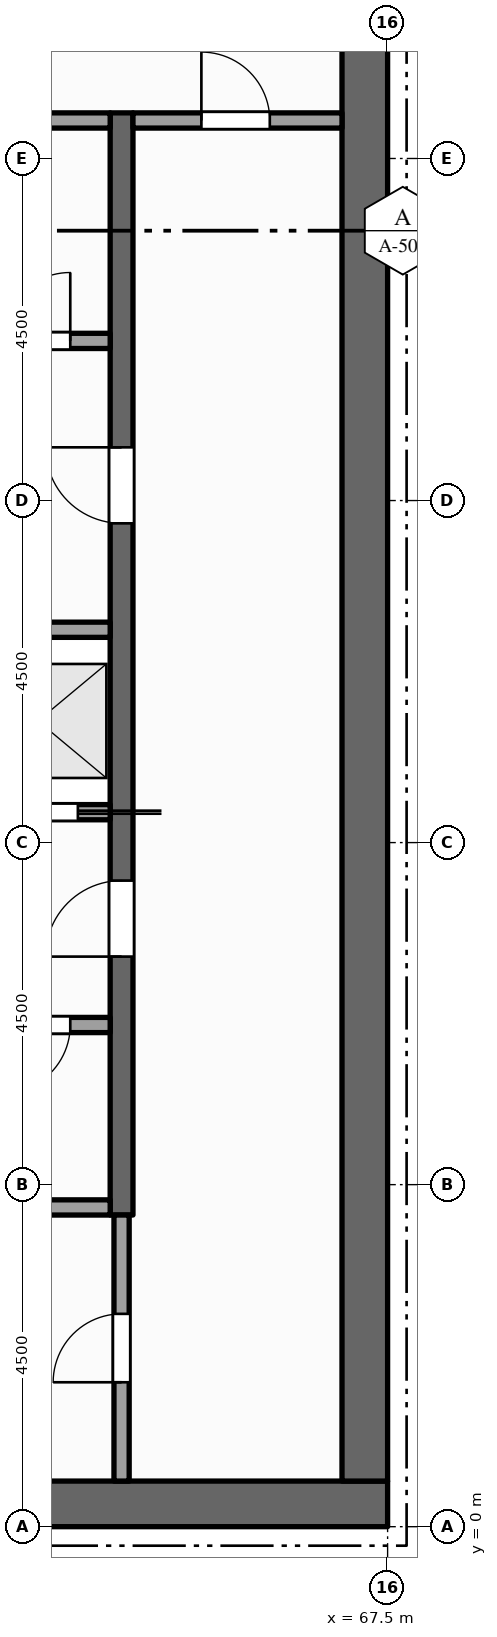
"""IFC4 building model, lengths in metres.
Left out: names, types, materials, properties, quantities, classifications, styles, units other than length and angle.
Written with IfcOpenShell. Run it as: python <this file> out.ifc"""

import sys

from ifc_helpers import new_model, si_unit, direction, frame, frame_2d, origin, place, context, subcontext, project, spatial, rectangle, extrude, element, fill, save


model = new_model("IFC4")
c1 = context("Model", 3, precision=1e-05, world=origin(), true_north=direction((0.0, 1.0)))
c2 = subcontext(c1, "Body", "Model", "MODEL_VIEW")
j1 = project(units=[si_unit("LENGTHUNIT", "METRE"), si_unit("PLANEANGLEUNIT", "RADIAN")], contexts=[c1])
p1 = place(None, origin())
s1 = spatial("IfcSite", under=j1, at=p1, CompositionType="ELEMENT")
p2 = place(p1, origin())
s2 = spatial("IfcBuilding", under=s1, at=p2, CompositionType="ELEMENT")
p3 = place(p2, frame((0.0, 0.0, 318.5)))
s3 = spatial("IfcBuildingStorey", under=s2, at=p3, CompositionType="ELEMENT", Elevation=318.5)
p4 = place(p3, frame((67.5, 0.3, -0.15), z_axis=(0.0, 0.0, 1.0), x_axis=(-1.0, 0.0, 0.0)))
e1 = element("IfcWall", 1, at=p4, inside=s3, PredefinedType="SHEAR", context=c2, shape_type="SweptSolid", body=[
    extrude(rectangle(XDim=13.5, YDim=0.6, at=frame_2d((6.75, 0.0))), origin(), (0.0, 0.0, 1.0), 4.5),
])
p5 = place(p3, frame((67.2, 0.6, -0.15), z_axis=(0.0, 0.0, 1.0), x_axis=(0.0, 1.0, 0.0)))
e2 = element("IfcWall", 2, at=p5, inside=s3, PredefinedType="SHEAR", context=c2, shape_type="SweptSolid", body=[
    extrude(rectangle(XDim=21.3, YDim=0.6, at=frame_2d((10.65, 0.0))), origin(), (0.0, 0.0, 1.0), 4.5),
])
p6 = place(p3, frame((64.0, 0.6, 0.0), z_axis=(0.0, 0.0, 1.0), x_axis=(0.0, 1.0, 0.0)))
e3 = element("IfcWall", 3, at=p6, inside=s3, PredefinedType="PARTITIONING", context=c2, shape_type="SweptSolid", body=[
    extrude(rectangle(XDim=3.5, YDim=0.2, at=frame_2d((1.75, 0.0))), origin(), (0.0, 0.0, 1.0), 4.35),
])
p7 = place(p6, frame((1.3, 0.0, 0.0)))
e4 = element("IfcOpeningElement", 4, at=p7, cuts=e3, PredefinedType="OPENING", context=c2, shape_type="SweptSolid", body=[
    extrude(rectangle(XDim=0.9, YDim=2.1, at=frame_2d((0.45, 1.05))), frame((0.0, 0.11, 0.0), z_axis=(0.0, -1.0, 0.0), x_axis=(1.0, 0.0, 0.0)), (0.0, 0.0, 1.0), 0.22),
])
p8 = place(p3, frame((64.0, 4.1, 0.0), z_axis=(0.0, 0.0, 1.0), x_axis=(0.0, 1.0, 0.0)))
e5 = element("IfcWall", 5, at=p8, inside=s3, PredefinedType="SHEAR", context=c2, shape_type="SweptSolid", body=[
    extrude(rectangle(XDim=14.5, YDim=0.3, at=frame_2d((7.25, 0.0))), origin(), (0.0, 0.0, 1.0), 4.35),
])
p9 = place(p8, frame((3.4, 0.0, 0.0)))
e6 = element("IfcOpeningElement", 6, at=p9, cuts=e5, PredefinedType="OPENING", context=c2, shape_type="SweptSolid", body=[
    extrude(rectangle(XDim=1.0, YDim=2.1, at=frame_2d((0.5, 1.05))), frame((0.0, 0.16, 0.0), z_axis=(0.0, -1.0, 0.0), x_axis=(1.0, 0.0, 0.0)), (0.0, 0.0, 1.0), 0.32),
])
p10 = place(p8, frame((9.1, 0.0, 0.0)))
e7 = element("IfcOpeningElement", 7, at=p10, cuts=e5, PredefinedType="OPENING", context=c2, shape_type="SweptSolid", body=[
    extrude(rectangle(XDim=1.0, YDim=2.1, at=frame_2d((0.5, 1.05))), frame((0.0, 0.16, 0.0), z_axis=(0.0, -1.0, 0.0), x_axis=(1.0, 0.0, 0.0)), (0.0, 0.0, 1.0), 0.32),
])
p11 = place(p3, frame((61.9, 4.2, 0.0), z_axis=(0.0, 0.0, 1.0), x_axis=(1.0, 0.0, 0.0)))
e8 = element("IfcWall", 8, at=p11, inside=s3, PredefinedType="PARTITIONING", context=c2, shape_type="SweptSolid", body=[
    extrude(rectangle(XDim=1.95, YDim=0.2, at=frame_2d((0.975, 0.0))), origin(), (0.0, 0.0, 1.0), 4.35),
])
p12 = place(p3, frame((61.9, 6.6, 0.0), z_axis=(0.0, 0.0, 1.0), x_axis=(1.0, 0.0, 0.0)))
e9 = element("IfcWall", 9, at=p12, inside=s3, PredefinedType="PARTITIONING", context=c2, shape_type="SweptSolid", body=[
    extrude(rectangle(XDim=1.95, YDim=0.2, at=frame_2d((0.975, 0.0))), origin(), (0.0, 0.0, 1.0), 4.35),
])
p13 = place(p12, frame((0.525, 0.0, 0.0)))
e10 = element("IfcOpeningElement", 10, at=p13, cuts=e9, PredefinedType="OPENING", context=c2, shape_type="SweptSolid", body=[
    extrude(rectangle(XDim=0.9, YDim=2.1, at=frame_2d((0.45, 1.05))), frame((0.0, 0.11, 0.0), z_axis=(0.0, -1.0, 0.0), x_axis=(1.0, 0.0, 0.0)), (0.0, 0.0, 1.0), 0.22),
])
p14 = place(p3, frame((61.9, 9.4, 0.0), z_axis=(0.0, 0.0, 1.0), x_axis=(1.0, 0.0, 0.0)))
e11 = element("IfcWall", 11, at=p14, inside=s3, PredefinedType="SOLIDWALL", context=c2, shape_type="SweptSolid", body=[
    extrude(rectangle(XDim=1.95, YDim=0.2, at=frame_2d((0.975, 0.0))), origin(), (0.0, 0.0, 1.0), 4.35),
])
p15 = place(p14, frame((0.425, 0.0, 0.012)))
e12 = element("IfcOpeningElement", 12, at=p15, cuts=e11, PredefinedType="OPENING", context=c2, shape_type="SweptSolid", body=[
    extrude(rectangle(XDim=1.1, YDim=2.1, at=frame_2d((0.55, 1.05))), frame((0.0, 0.11, 0.0), z_axis=(0.0, -1.0, 0.0), x_axis=(1.0, 0.0, 0.0)), (0.0, 0.0, 1.0), 0.22),
])
p16 = place(p3, frame((61.9, 11.8, 0.0), z_axis=(0.0, 0.0, 1.0), x_axis=(1.0, 0.0, 0.0)))
e13 = element("IfcWall", 13, at=p16, inside=s3, PredefinedType="SOLIDWALL", context=c2, shape_type="SweptSolid", body=[
    extrude(rectangle(XDim=1.95, YDim=0.2, at=frame_2d((0.975, 0.0))), origin(), (0.0, 0.0, 1.0), 4.35),
])
p17 = place(p3, frame((61.9, 15.6, 0.0), z_axis=(0.0, 0.0, 1.0), x_axis=(1.0, 0.0, 0.0)))
e14 = element("IfcWall", 14, at=p17, inside=s3, PredefinedType="PARTITIONING", context=c2, shape_type="SweptSolid", body=[
    extrude(rectangle(XDim=1.95, YDim=0.2, at=frame_2d((0.975, 0.0))), origin(), (0.0, 0.0, 1.0), 4.35),
])
p18 = place(p17, frame((0.525, 0.0, 0.0)))
e15 = element("IfcOpeningElement", 15, at=p18, cuts=e14, PredefinedType="OPENING", context=c2, shape_type="SweptSolid", body=[
    extrude(rectangle(XDim=0.9, YDim=2.1, at=frame_2d((0.45, 1.05))), frame((0.0, 0.11, 0.0), z_axis=(0.0, -1.0, 0.0), x_axis=(1.0, 0.0, 0.0)), (0.0, 0.0, 1.0), 0.22),
])
p19 = place(p3, frame((61.9, 18.5, 0.0), z_axis=(0.0, 0.0, 1.0), x_axis=(1.0, 0.0, 0.0)))
e16 = element("IfcWall", 16, at=p19, inside=s3, PredefinedType="PARTITIONING", context=c2, shape_type="SweptSolid", body=[
    extrude(rectangle(XDim=1.95, YDim=0.2, at=frame_2d((0.975, 0.0))), origin(), (0.0, 0.0, 1.0), 4.35),
])
p20 = place(p3, frame((64.15, 18.5, 0.0), z_axis=(0.0, 0.0, 1.0), x_axis=(1.0, 0.0, 0.0)))
e17 = element("IfcWall", 17, at=p20, inside=s3, PredefinedType="PARTITIONING", context=c2, shape_type="SweptSolid", body=[
    extrude(rectangle(XDim=2.75, YDim=0.2, at=frame_2d((1.375, 0.0))), origin(), (0.0, 0.0, 1.0), 4.35),
])
p21 = place(p20, frame((0.9, 0.0, 0.0)))
e18 = element("IfcOpeningElement", 18, at=p21, cuts=e17, PredefinedType="OPENING", context=c2, shape_type="SweptSolid", body=[
    extrude(rectangle(XDim=0.9, YDim=2.1, at=frame_2d((0.45, 1.05))), frame((0.0, 0.11, 0.0), z_axis=(0.0, -1.0, 0.0), x_axis=(1.0, 0.0, 0.0)), (0.0, 0.0, 1.0), 0.22),
])
p22 = place(p15, origin())
e19 = element("IfcDoor", 19, at=p22, inside=s3, OperationType="SLIDING_TO_RIGHT", PredefinedType="DOOR", context=c2, shape_type="SweptSolid", body=[
    extrude(rectangle(XDim=1.1, YDim=2.1, at=frame_2d((0.55, 1.05))), frame((0.0, 0.025, 0.0), z_axis=(0.0, -1.0, 0.0), x_axis=(1.0, 0.0, 0.0)), (0.0, 0.0, 1.0), 0.05),
])
fill(e12, e19)
p23 = place(p9, origin())
e20 = element("IfcDoor", 20, at=p23, inside=s3, OperationType="SINGLE_SWING_LEFT", PredefinedType="DOOR", context=c2, shape_type="SweptSolid", body=[
    extrude(rectangle(XDim=1.0, YDim=2.1, at=frame_2d((0.5, 1.05))), frame((0.0, 0.025, 0.0), z_axis=(0.0, -1.0, 0.0), x_axis=(1.0, 0.0, 0.0)), (0.0, 0.0, 1.0), 0.05),
])
fill(e6, e20)
p24 = place(p10, origin())
e21 = element("IfcDoor", 21, at=p24, inside=s3, OperationType="SINGLE_SWING_RIGHT", PredefinedType="DOOR", context=c2, shape_type="SweptSolid", body=[
    extrude(rectangle(XDim=1.0, YDim=2.1, at=frame_2d((0.5, 1.05))), frame((0.0, 0.025, 0.0), z_axis=(0.0, -1.0, 0.0), x_axis=(1.0, 0.0, 0.0)), (0.0, 0.0, 1.0), 0.05),
])
fill(e7, e21)
p25 = place(p7, origin())
e22 = element("IfcDoor", 22, at=p25, inside=s3, OperationType="SINGLE_SWING_LEFT", PredefinedType="DOOR", context=c2, shape_type="SweptSolid", body=[
    extrude(rectangle(XDim=0.9, YDim=2.1, at=frame_2d((0.45, 1.05))), frame((0.0, 0.025, 0.0), z_axis=(0.0, -1.0, 0.0), x_axis=(1.0, 0.0, 0.0)), (0.0, 0.0, 1.0), 0.05),
])
fill(e4, e22)
p26 = place(p21, origin())
e23 = element("IfcDoor", 23, at=p26, inside=s3, OperationType="SINGLE_SWING_LEFT", PredefinedType="DOOR", context=c2, shape_type="SweptSolid", body=[
    extrude(rectangle(XDim=0.9, YDim=2.1, at=frame_2d((0.45, 1.05))), frame((0.0, 0.025, 0.0), z_axis=(0.0, -1.0, 0.0), x_axis=(1.0, 0.0, 0.0)), (0.0, 0.0, 1.0), 0.05),
])
fill(e18, e23)
p27 = place(p13, origin())
e24 = element("IfcDoor", 24, at=p27, inside=s3, OperationType="SINGLE_SWING_LEFT", PredefinedType="DOOR", context=c2, shape_type="SweptSolid", body=[
    extrude(rectangle(XDim=0.9, YDim=2.1, at=frame_2d((0.45, 1.05))), frame((0.0, 0.025, 0.0), z_axis=(0.0, -1.0, 0.0), x_axis=(1.0, 0.0, 0.0)), (0.0, 0.0, 1.0), 0.05),
])
fill(e10, e24)
p28 = place(p18, origin())
e25 = element("IfcDoor", 25, at=p28, inside=s3, OperationType="SINGLE_SWING_RIGHT", PredefinedType="DOOR", context=c2, shape_type="SweptSolid", body=[
    extrude(rectangle(XDim=0.9, YDim=2.1, at=frame_2d((0.45, 1.05))), frame((0.0, 0.025, 0.0), z_axis=(0.0, -1.0, 0.0), x_axis=(1.0, 0.0, 0.0)), (0.0, 0.0, 1.0), 0.05),
])
fill(e15, e25)
save(model, sys.argv[1])
